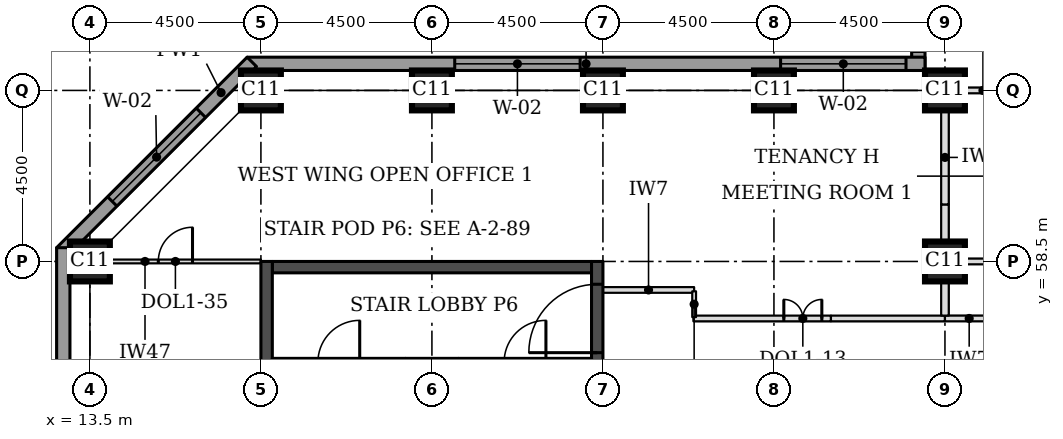
"""IFC4 building model, lengths in metres.
Left out: names, types, materials, properties, quantities, classifications, styles, units other than length and angle.
Written with IfcOpenShell. Run it as: python <this file> out.ifc"""

import sys

from ifc_helpers import new_model, si_unit, direction, frame, frame_2d, origin, origin_2d, place, context, subcontext, project, spatial, rectangle, extrude, element, fill, save


model = new_model("IFC4")
c1 = context("Model", 3, precision=1e-05, world=origin(), true_north=direction((0.0, 1.0)))
c2 = subcontext(c1, "Body", "Model", "MODEL_VIEW")
j1 = project(units=[si_unit("LENGTHUNIT", "METRE"), si_unit("PLANEANGLEUNIT", "RADIAN")], contexts=[c1])
p1 = place(None, origin())
s1 = spatial("IfcSite", under=j1, at=p1, CompositionType="ELEMENT")
p2 = place(p1, origin())
s2 = spatial("IfcBuilding", under=s1, at=p2, CompositionType="ELEMENT")
p3 = place(p2, frame((0.0, 0.0, 82.6)))
s3 = spatial("IfcBuildingStorey", under=s2, at=p3, CompositionType="ELEMENT", Elevation=82.6)
for number, where, z_axis, x_axis in (
    (1, (13.5, 58.5, 0.0), (0.0, 0.0, 1.0), (1.0, 0.0, 0.0)),
    (2, (36.0, 58.5, 0.0), (0.0, 0.0, 1.0), (1.0, 0.0, 0.0)),
    (3, (18.0, 63.0, 0.0), (0.0, 0.0, 1.0), (1.0, 0.0, 0.0)),
    (4, (22.5, 63.0, 0.0), (0.0, 0.0, 1.0), (1.0, 0.0, 0.0)),
    (5, (27.0, 63.0, 0.0), (0.0, 0.0, 1.0), (1.0, 0.0, 0.0)),
    (6, (31.5, 63.0, 0.0), (0.0, 0.0, 1.0), (1.0, 0.0, 0.0)),
    (7, (36.0, 63.0, 0.0), (0.0, 0.0, 1.0), (1.0, 0.0, 0.0)),
):
    element("IfcColumn", number, at=place(p3, frame(where, z_axis=z_axis, x_axis=x_axis)), inside=s3, PredefinedType="COLUMN", context=c2, shape_type="SweptSolid", body=[
        extrude(rectangle(XDim=1.05, YDim=1.05, at=origin_2d()), origin(), (0.0, 0.0, 1.0), 3.7),
    ])
p4 = place(p3, frame((18.3, 58.35, 0.0), z_axis=(0.0, 0.0, 1.0), x_axis=(1.0, 0.0, 0.0)))
e8 = element("IfcWall", 8, at=p4, inside=s3, PredefinedType="SHEAR", context=c2, shape_type="SweptSolid", body=[
    extrude(rectangle(XDim=8.4, YDim=0.3, at=frame_2d((4.2, 0.0))), origin(), (0.0, 0.0, 1.0), 3.7),
])
p5 = place(p3, frame((18.15, 49.5, 0.0), z_axis=(0.0, 0.0, 1.0), x_axis=(0.0, 1.0, 0.0)))
e9 = element("IfcWall", 9, at=p5, inside=s3, PredefinedType="SHEAR", context=c2, shape_type="SweptSolid", body=[
    extrude(rectangle(XDim=9.0, YDim=0.3, at=frame_2d((4.5, 0.0))), origin(), (0.0, 0.0, 1.0), 3.7),
])
p6 = place(p3, frame((26.85, 49.5, 0.0), z_axis=(0.0, 0.0, 1.0), x_axis=(0.0, 1.0, 0.0)))
e10 = element("IfcWall", 10, at=p6, inside=s3, PredefinedType="SHEAR", context=c2, shape_type="SweptSolid", body=[
    extrude(rectangle(XDim=9.0, YDim=0.3, at=frame_2d((4.5, 0.0))), origin(), (0.0, 0.0, 1.0), 3.7),
])
p7 = place(p6, frame((6.6, 0.0, 0.0)))
e11 = element("IfcOpeningElement", 11, at=p7, cuts=e10, PredefinedType="OPENING", context=c2, shape_type="SweptSolid", body=[
    extrude(rectangle(XDim=1.8, YDim=2.1, at=frame_2d((0.9, 1.05))), frame((0.0, 0.16, 0.0), z_axis=(0.0, -1.0, 0.0), x_axis=(1.0, 0.0, 0.0)), (0.0, 0.0, 1.0), 0.32),
])
p8 = place(p3, frame((35.3, 76.862, 0.0), z_axis=(0.0, 0.0, 1.0), x_axis=(0.0, -1.0, 0.0)))
e12 = element("IfcWall", 12, at=p8, inside=s3, PredefinedType="STANDARD", context=c2, shape_type="SweptSolid", body=[
    extrude(rectangle(XDim=13.337, YDim=0.35, at=frame_2d((6.669, 0.0))), origin(), (0.0, 0.0, 1.0), 3.525),
])
p9 = place(p8, frame((9.537, 0.0, 0.9)))
e13 = element("IfcOpeningElement", 13, at=p9, cuts=e12, PredefinedType="OPENING", context=c2, shape_type="SweptSolid", body=[
    extrude(rectangle(XDim=3.3, YDim=1.9, at=frame_2d((1.65, 0.95))), frame((0.0, 0.185, 0.0), z_axis=(0.0, -1.0, 0.0), x_axis=(1.0, 0.0, 0.0)), (0.0, 0.0, 1.0), 0.37),
])
p10 = place(p3, frame((35.475, 63.7, 0.0), z_axis=(0.0, 0.0, 1.0), x_axis=(-1.0, 0.0, 0.0)))
e14 = element("IfcWall", 14, at=p10, inside=s3, PredefinedType="STANDARD", context=c2, shape_type="SweptSolid", body=[
    extrude(rectangle(XDim=17.837, YDim=0.35, at=frame_2d((8.919, 0.0))), origin(), (0.0, 0.0, 1.0), 3.525),
])
p11 = place(p10, frame((0.5, 0.0, 0.9)))
e15 = element("IfcOpeningElement", 15, at=p11, cuts=e14, PredefinedType="OPENING", context=c2, shape_type="SweptSolid", body=[
    extrude(rectangle(XDim=3.3, YDim=1.9, at=frame_2d((1.65, 0.95))), frame((0.0, 0.185, 0.0), z_axis=(0.0, -1.0, 0.0), x_axis=(1.0, 0.0, 0.0)), (0.0, 0.0, 1.0), 0.37),
])
p12 = place(p10, frame((9.075, 0.0, 0.9)))
e16 = element("IfcOpeningElement", 16, at=p12, cuts=e14, PredefinedType="OPENING", context=c2, shape_type="SweptSolid", body=[
    extrude(rectangle(XDim=3.3, YDim=1.9, at=frame_2d((1.65, 0.95))), frame((0.0, 0.185, 0.0), z_axis=(0.0, -1.0, 0.0), x_axis=(1.0, 0.0, 0.0)), (0.0, 0.0, 1.0), 0.37),
])
p13 = place(p3, frame((17.761, 63.751, 0.0), z_axis=(0.0, 0.0, 1.0), x_axis=(-0.707106781187, -0.707106781187, 0.0)))
e17 = element("IfcWall", 17, at=p13, inside=s3, PredefinedType="STANDARD", context=c2, shape_type="SweptSolid", body=[
    extrude(rectangle(XDim=7.089, YDim=0.35, at=frame_2d((3.544, 0.0))), origin(), (0.0, 0.0, 1.0), 3.525),
])
p14 = place(p13, frame((1.894, 0.0, 0.9)))
e18 = element("IfcOpeningElement", 18, at=p14, cuts=e17, PredefinedType="OPENING", context=c2, shape_type="SweptSolid", body=[
    extrude(rectangle(XDim=3.3, YDim=1.9, at=frame_2d((1.65, 0.95))), frame((0.0, 0.185, 0.0), z_axis=(0.0, -1.0, 0.0), x_axis=(1.0, 0.0, 0.0)), (0.0, 0.0, 1.0), 0.37),
])
p15 = place(p3, frame((12.8, 58.862, 0.0), z_axis=(0.0, 0.0, 1.0), x_axis=(0.0, -1.0, 0.0)))
e19 = element("IfcWall", 19, at=p15, inside=s3, PredefinedType="STANDARD", context=c2, shape_type="SweptSolid", body=[
    extrude(rectangle(XDim=14.225, YDim=0.35, at=frame_2d((7.112, 0.0))), origin(), (0.0, 0.0, 1.0), 3.525),
])
p16 = place(p15, frame((5.462, 0.0, 0.9)))
e20 = element("IfcOpeningElement", 20, at=p16, cuts=e19, PredefinedType="OPENING", context=c2, shape_type="SweptSolid", body=[
    extrude(rectangle(XDim=3.3, YDim=1.9, at=frame_2d((1.65, 0.95))), frame((0.0, 0.185, 0.0), z_axis=(0.0, -1.0, 0.0), x_axis=(1.0, 0.0, 0.0)), (0.0, 0.0, 1.0), 0.37),
])
p17 = place(p3, frame((29.38, 57.0, 0.0), z_axis=(0.0, 0.0, 1.0), x_axis=(1.0, 0.0, 0.0)))
e21 = element("IfcWall", 21, at=p17, inside=s3, PredefinedType="PARTITIONING", context=c2, shape_type="SweptSolid", body=[
    extrude(rectangle(XDim=3.62, YDim=0.15, at=frame_2d((1.81, 0.0))), origin(), (0.0, 0.0, 1.0), 3.55),
])
p18 = place(p17, frame((2.38, 0.0, 0.0)))
e22 = element("IfcOpeningElement", 22, at=p18, cuts=e21, PredefinedType="OPENING", context=c2, shape_type="SweptSolid", body=[
    extrude(rectangle(XDim=1.0, YDim=2.1, at=frame_2d((0.5, 1.05))), frame((0.0, 0.085, 0.0), z_axis=(0.0, -1.0, 0.0), x_axis=(1.0, 0.0, 0.0)), (0.0, 0.0, 1.0), 0.17),
])
p19 = place(p3, frame((33.0, 57.0, 0.0), z_axis=(0.0, 0.0, 1.0), x_axis=(1.0, 0.0, 0.0)))
e23 = element("IfcWall", 23, at=p19, inside=s3, PredefinedType="PARTITIONING", context=c2, shape_type="SweptSolid", body=[
    extrude(rectangle(XDim=3.0, YDim=0.15, at=frame_2d((1.5, 0.0))), origin(), (0.0, 0.0, 1.0), 3.55),
])
p20 = place(p3, frame((36.0, 57.0, 0.0), z_axis=(0.0, 0.0, 1.0), x_axis=(1.0, 0.0, 0.0)))
e24 = element("IfcWall", 24, at=p20, inside=s3, PredefinedType="PARTITIONING", context=c2, shape_type="SweptSolid", body=[
    extrude(rectangle(XDim=6.075, YDim=0.15, at=frame_2d((3.038, 0.0))), origin(), (0.0, 0.0, 1.0), 3.55),
])
for number, where, z_axis, x_axis in (
    (25, (36.525, 58.5, 0.0), (0.0, 0.0, 1.0), (1.0, 0.0, 0.0)),
    (26, (36.525, 63.0, 0.0), (0.0, 0.0, 1.0), (1.0, 0.0, 0.0)),
):
    element("IfcWall", number, at=place(p3, frame(where, z_axis=z_axis, x_axis=x_axis)), inside=s3, PredefinedType="PARTITIONING", context=c2, shape_type="SweptSolid", body=[
        extrude(rectangle(XDim=2.55, YDim=0.15, at=frame_2d((1.275, 0.0))), origin(), (0.0, 0.0, 1.0), 3.55),
    ])
p21 = place(p3, frame((36.0, 57.075, 0.0), z_axis=(0.0, 0.0, 1.0), x_axis=(0.0, 1.0, 0.0)))
e27 = element("IfcWall", 27, at=p21, inside=s3, PredefinedType="PARTITIONING", context=c2, shape_type="SweptSolid", body=[
    extrude(rectangle(XDim=0.9, YDim=0.2, at=frame_2d((0.45, 0.0))), origin(), (0.0, 0.0, 1.0), 2.8),
])
p22 = place(p3, frame((36.0, 58.995, 0.0), z_axis=(0.0, 0.0, 1.0), x_axis=(0.0, 1.0, 0.0)))
e28 = element("IfcWall", 28, at=p22, inside=s3, PredefinedType="PARTITIONING", context=c2, shape_type="SweptSolid", body=[
    extrude(rectangle(XDim=1.005, YDim=0.2, at=frame_2d((0.502, 0.0))), origin(), (0.0, 0.0, 1.0), 2.8),
])
p23 = place(p3, frame((36.0, 60.0, 0.0), z_axis=(0.0, 0.0, 1.0), x_axis=(0.0, 1.0, 0.0)))
e29 = element("IfcWall", 29, at=p23, inside=s3, PredefinedType="PARTITIONING", context=c2, shape_type="SweptSolid", body=[
    extrude(rectangle(XDim=2.475, YDim=0.2, at=frame_2d((1.238, 0.0))), origin(), (0.0, 0.0, 1.0), 2.8),
])
p24 = place(p3, frame((13.5, 58.5, 0.0), z_axis=(0.0, 0.0, 1.0), x_axis=(1.0, 0.0, 0.0)))
e30 = element("IfcWall", 30, at=p24, inside=s3, PredefinedType="PARTITIONING", context=c2, shape_type="SweptSolid", body=[
    extrude(rectangle(XDim=4.5, YDim=0.1, at=frame_2d((2.25, 0.0))), origin(), (0.0, 0.0, 1.0), 2.55),
])
p25 = place(p24, frame((1.8, 0.0, 0.0)))
e31 = element("IfcOpeningElement", 31, at=p25, cuts=e30, PredefinedType="OPENING", context=c2, shape_type="SweptSolid", body=[
    extrude(rectangle(XDim=0.9, YDim=2.1, at=frame_2d((0.45, 1.05))), frame((0.0, 0.06, 0.0), z_axis=(0.0, -1.0, 0.0), x_axis=(1.0, 0.0, 0.0)), (0.0, 0.0, 1.0), 0.12),
])
p26 = place(p3, frame((27.0, 57.75, 0.0), z_axis=(0.0, 0.0, 1.0), x_axis=(1.0, 0.0, 0.0)))
e32 = element("IfcWall", 32, at=p26, inside=s3, PredefinedType="PARTITIONING", context=c2, shape_type="SweptSolid", body=[
    extrude(rectangle(XDim=2.4, YDim=0.15, at=frame_2d((1.2, 0.0))), origin(), (0.0, 0.0, 1.0), 3.55),
])
p27 = place(p3, frame((29.4, 57.715, 0.0), z_axis=(0.0, 0.0, 1.0), x_axis=(0.0, -1.0, 0.0)))
e33 = element("IfcWall", 33, at=p27, inside=s3, PredefinedType="PARTITIONING", context=c2, shape_type="SweptSolid", body=[
    extrude(rectangle(XDim=0.68, YDim=0.1, at=frame_2d((0.34, 0.0))), origin(), (0.0, 0.0, 1.0), 3.55),
])
p28 = place(p3, frame((21.8, 55.85, 0.0), z_axis=(0.0, 0.0, 1.0), x_axis=(1.0, 0.0, 0.0)))
e34 = element("IfcWall", 34, at=p28, inside=s3, PredefinedType="SOLIDWALL", context=c2, shape_type="SweptSolid", body=[
    extrude(rectangle(XDim=1.4, YDim=0.2, at=frame_2d((0.7, 0.0))), origin(), (0.0, 0.0, 1.0), 3.55),
])
p29 = place(p3, frame((18.3, 55.85, 0.0), z_axis=(0.0, 0.0, 1.0), x_axis=(1.0, 0.0, 0.0)))
e35 = element("IfcWall", 35, at=p29, inside=s3, PredefinedType="SOLIDWALL", context=c2, shape_type="SweptSolid", body=[
    extrude(rectangle(XDim=3.5, YDim=0.2, at=frame_2d((1.75, 0.0))), origin(), (0.0, 0.0, 1.0), 3.55),
])
p30 = place(p29, frame((1.2, 0.0, 0.0)))
e36 = element("IfcOpeningElement", 36, at=p30, cuts=e35, PredefinedType="OPENING", context=c2, shape_type="SweptSolid", body=[
    extrude(rectangle(XDim=1.1, YDim=2.1, at=frame_2d((0.55, 1.05))), frame((0.0, 0.11, 0.0), z_axis=(0.0, -1.0, 0.0), x_axis=(1.0, 0.0, 0.0)), (0.0, 0.0, 1.0), 0.22),
])
p31 = place(p3, frame((23.2, 55.85, 0.0), z_axis=(0.0, 0.0, 1.0), x_axis=(1.0, 0.0, 0.0)))
e37 = element("IfcWall", 37, at=p31, inside=s3, PredefinedType="SOLIDWALL", context=c2, shape_type="SweptSolid", body=[
    extrude(rectangle(XDim=3.5, YDim=0.2, at=frame_2d((1.75, 0.0))), origin(), (0.0, 0.0, 1.0), 3.55),
])
p32 = place(p31, frame((1.2, 0.0, 0.0)))
e38 = element("IfcOpeningElement", 38, at=p32, cuts=e37, PredefinedType="OPENING", context=c2, shape_type="SweptSolid", body=[
    extrude(rectangle(XDim=1.1, YDim=2.1, at=frame_2d((0.55, 1.05))), frame((0.0, 0.11, 0.0), z_axis=(0.0, -1.0, 0.0), x_axis=(1.0, 0.0, 0.0)), (0.0, 0.0, 1.0), 0.22),
])
p33 = place(p11, origin())
e39 = element("IfcWindow", 39, at=p33, inside=s3, PartitioningType="SINGLE_PANEL", PredefinedType="WINDOW", context=c2, shape_type="SweptSolid", body=[
    extrude(rectangle(XDim=3.3, YDim=1.9, at=frame_2d((1.65, 0.95))), frame((0.0, 0.085, 0.0), z_axis=(0.0, -1.0, 0.0), x_axis=(1.0, 0.0, 0.0)), (0.0, 0.0, 1.0), 0.06),
])
fill(e15, e39)
p34 = place(p12, origin())
e40 = element("IfcWindow", 40, at=p34, inside=s3, PartitioningType="SINGLE_PANEL", PredefinedType="WINDOW", context=c2, shape_type="SweptSolid", body=[
    extrude(rectangle(XDim=3.3, YDim=1.9, at=frame_2d((1.65, 0.95))), frame((0.0, 0.085, 0.0), z_axis=(0.0, -1.0, 0.0), x_axis=(1.0, 0.0, 0.0)), (0.0, 0.0, 1.0), 0.06),
])
fill(e16, e40)
p35 = place(p14, origin())
e41 = element("IfcWindow", 41, at=p35, inside=s3, PartitioningType="SINGLE_PANEL", PredefinedType="WINDOW", context=c2, shape_type="SweptSolid", body=[
    extrude(rectangle(XDim=3.3, YDim=1.9, at=frame_2d((1.65, 0.95))), frame((0.0, 0.085, 0.0), z_axis=(0.0, -1.0, 0.0), x_axis=(1.0, 0.0, 0.0)), (0.0, 0.0, 1.0), 0.06),
])
fill(e18, e41)
p36 = place(p18, origin())
e42 = element("IfcDoor", 42, at=p36, inside=s3, OperationType="DOUBLE_DOOR_SINGLE_SWING", PredefinedType="DOOR", context=c2, shape_type="SweptSolid", body=[
    extrude(rectangle(XDim=1.0, YDim=2.1, at=frame_2d((0.5, 1.05))), frame((0.0, 0.025, 0.0), z_axis=(0.0, -1.0, 0.0), x_axis=(1.0, 0.0, 0.0)), (0.0, 0.0, 1.0), 0.05),
])
fill(e22, e42)
p37 = place(p25, origin())
e43 = element("IfcDoor", 43, at=p37, inside=s3, OperationType="SINGLE_SWING_RIGHT", PredefinedType="DOOR", context=c2, shape_type="SweptSolid", body=[
    extrude(rectangle(XDim=0.9, YDim=2.1, at=frame_2d((0.45, 1.05))), frame((0.0, 0.025, 0.0), z_axis=(0.0, -1.0, 0.0), x_axis=(1.0, 0.0, 0.0)), (0.0, 0.0, 1.0), 0.05),
])
fill(e31, e43)
p38 = place(p7, origin())
e44 = element("IfcDoor", 44, at=p38, inside=s3, OperationType="SINGLE_SWING_LEFT", PredefinedType="DOOR", context=c2, shape_type="SweptSolid", body=[
    extrude(rectangle(XDim=1.8, YDim=2.1, at=frame_2d((0.9, 1.05))), frame((0.0, 0.025, 0.0), z_axis=(0.0, -1.0, 0.0), x_axis=(1.0, 0.0, 0.0)), (0.0, 0.0, 1.0), 0.05),
])
fill(e11, e44)
save(model, sys.argv[1])
